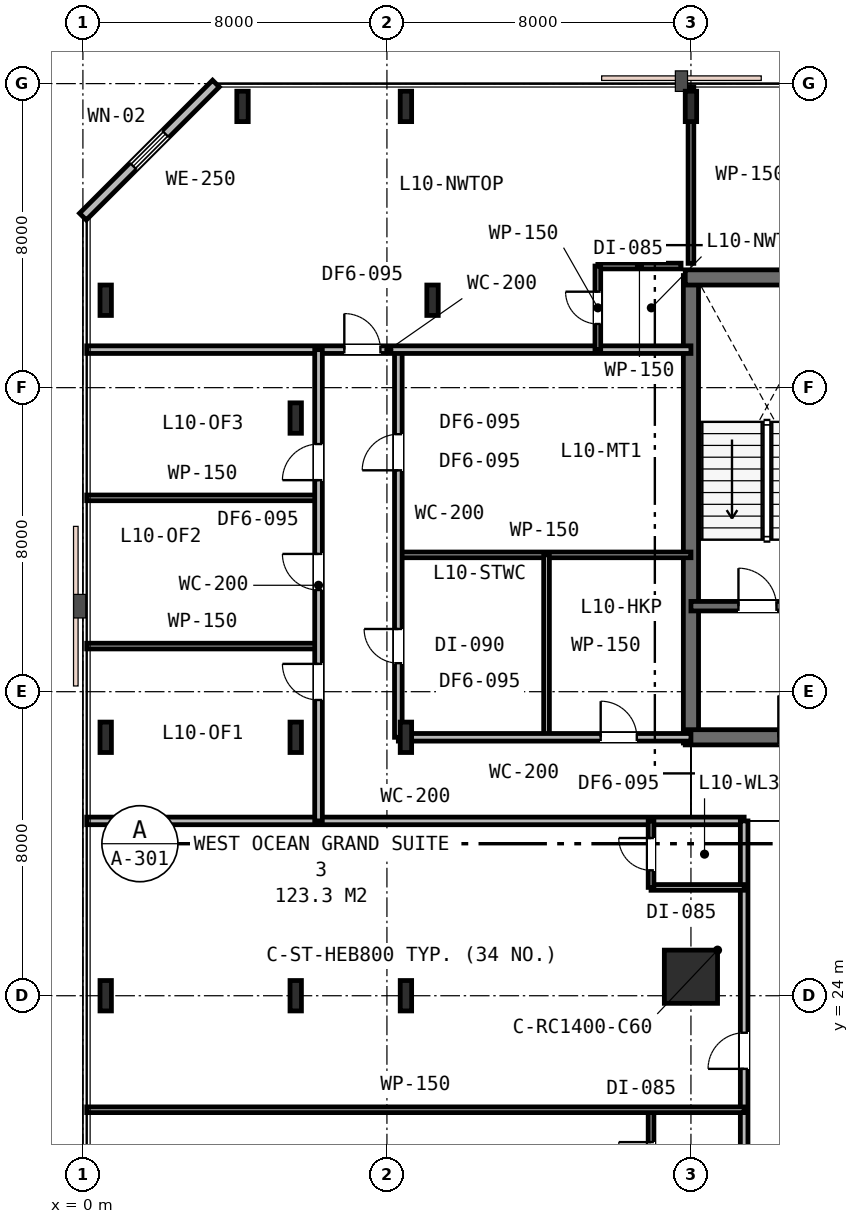
"""IFC4 building model, lengths in metres.
Left out: names, types, materials, properties, quantities, classifications, styles, units other than length and angle.
Written with IfcOpenShell. Run it as: python <this file> out.ifc"""

import sys

from ifc_helpers import new_model, si_unit, direction, frame, frame_2d, origin, origin_2d, place, context, subcontext, project, spatial, rectangle, i_section, extrude, element, fill, save


model = new_model("IFC4")
c1 = context("Model", 3, precision=1e-05, world=origin(), true_north=direction((0.0, 1.0)))
c2 = subcontext(c1, "Body", "Model", "MODEL_VIEW")
j1 = project(units=[si_unit("LENGTHUNIT", "METRE"), si_unit("PLANEANGLEUNIT", "RADIAN")], contexts=[c1])
p1 = place(None, origin())
s1 = spatial("IfcSite", under=j1, at=p1, CompositionType="ELEMENT")
p2 = place(p1, origin())
s2 = spatial("IfcBuilding", under=s1, at=p2, CompositionType="ELEMENT")
p3 = place(p2, frame((0.0, 0.0, 43.8)))
s3 = spatial("IfcBuildingStorey", under=s2, at=p3, CompositionType="ELEMENT", Elevation=43.8)
p4 = place(p3, frame((16.0, 30.65, 0.0), z_axis=(0.0, 0.0, 1.0), x_axis=(0.0, 1.0, 0.0)))
e1 = element("IfcWall", 1, at=p4, inside=s3, PredefinedType="SHEAR", context=c2, shape_type="SweptSolid", body=[
    extrude(rectangle(XDim=12.3, YDim=0.4, at=frame_2d((6.15, 0.0))), origin(), (0.0, 0.0, 1.0), 3.6),
])
p5 = place(p3, frame((15.85, 42.9, 0.0), z_axis=(0.0, 0.0, 1.0), x_axis=(1.0, 0.0, 0.0)))
e2 = element("IfcWall", 2, at=p5, inside=s3, PredefinedType="SHEAR", context=c2, shape_type="SweptSolid", body=[
    extrude(rectangle(XDim=24.3, YDim=0.4, at=frame_2d((12.15, 0.0))), origin(), (0.0, 0.0, 1.0), 3.6),
])
p6 = place(p3, frame((15.85, 30.8, 0.0), z_axis=(0.0, 0.0, 1.0), x_axis=(1.0, 0.0, 0.0)))
e3 = element("IfcWall", 3, at=p6, inside=s3, PredefinedType="SHEAR", context=c2, shape_type="SweptSolid", body=[
    extrude(rectangle(XDim=11.2, YDim=0.4, at=frame_2d((5.6, 0.0))), origin(), (0.0, 0.0, 1.0), 3.6),
])
p7 = place(p6, frame((2.45, 0.0, 0.0)))
e4 = element("IfcOpeningElement", 4, at=p7, cuts=e3, PredefinedType="OPENING", context=c2, shape_type="SweptSolid", body=[
    extrude(rectangle(XDim=1.1, YDim=2.15, at=frame_2d((0.55, 1.075))), frame((0.0, 0.21, 0.0), z_axis=(0.0, -1.0, 0.0), x_axis=(1.0, 0.0, 0.0)), (0.0, 0.0, 1.0), 0.42),
])
p8 = place(p3, frame((16.0, 34.25, 0.0), z_axis=(0.0, 0.0, 1.0), x_axis=(1.0, 0.0, 0.0)))
e5 = element("IfcWall", 5, at=p8, inside=s3, PredefinedType="SHEAR", context=c2, shape_type="SweptSolid", body=[
    extrude(rectangle(XDim=6.05, YDim=0.25, at=frame_2d((3.025, 0.0))), origin(), (0.0, 0.0, 1.0), 3.6),
])
p9 = place(p8, frame((1.25, 0.0, 0.0)))
e6 = element("IfcOpeningElement", 6, at=p9, cuts=e5, PredefinedType="OPENING", context=c2, shape_type="SweptSolid", body=[
    extrude(rectangle(XDim=1.0, YDim=2.15, at=frame_2d((0.5, 1.075))), frame((0.0, 0.135, 0.0), z_axis=(0.0, -1.0, 0.0), x_axis=(1.0, 0.0, 0.0)), (0.0, 0.0, 1.0), 0.27),
])
p10 = place(p8, frame((4.2, 0.0, 0.0)))
e7 = element("IfcOpeningElement", 7, at=p10, cuts=e5, PredefinedType="OPENING", context=c2, shape_type="SweptSolid", body=[
    extrude(rectangle(XDim=1.1, YDim=2.15, at=frame_2d((0.55, 1.075))), frame((0.0, 0.135, 0.0), z_axis=(0.0, -1.0, 0.0), x_axis=(1.0, 0.0, 0.0)), (0.0, 0.0, 1.0), 0.27),
])
p11 = place(p3, frame((8.5, 24.0, 0.0), z_axis=(0.0, 0.0, 1.0), x_axis=(1.0, 0.0, 0.0)))
e8 = element("IfcColumn", 8, at=p11, inside=s3, PredefinedType="COLUMN", context=c2, shape_type="SweptSolid", body=[
    extrude(i_section(OverallWidth=0.3, OverallDepth=0.8, WebThickness=0.018, FlangeThickness=0.033, FilletRadius=0.03, at=origin_2d()), origin(), (0.0, 0.0, 1.0), 3.6),
])
p12 = place(p3, frame((16.0, 24.5, 0.0), z_axis=(0.0, 0.0, 1.0), x_axis=(1.0, 0.0, 0.0)))
e9 = element("IfcColumn", 9, at=p12, inside=s3, PredefinedType="COLUMN", context=c2, shape_type="SweptSolid", body=[
    extrude(rectangle(XDim=1.4, YDim=1.4, at=origin_2d()), origin(), (0.0, 0.0, 1.0), 3.6),
])
for number, where, z_axis, x_axis in (
    (10, (5.6, 24.0, 0.0), (0.0, 0.0, 1.0), (1.0, 0.0, 0.0)),
    (11, (5.6, 30.8, 0.0), (0.0, 0.0, 1.0), (1.0, 0.0, 0.0)),
    (12, (5.6, 39.2, 0.0), (0.0, 0.0, 1.0), (1.0, 0.0, 0.0)),
    (13, (8.5, 30.8, 0.0), (0.0, 0.0, 1.0), (1.0, 0.0, 0.0)),
    (14, (9.2, 42.3, 0.0), (0.0, 0.0, 1.0), (1.0, 0.0, 0.0)),
    (15, (0.6, 24.0, 0.0), (0.0, 0.0, 1.0), (1.0, 0.0, 0.0)),
    (16, (0.6, 30.8, 0.0), (0.0, 0.0, 1.0), (1.0, 0.0, 0.0)),
    (17, (0.6, 42.3, 0.0), (0.0, 0.0, 1.0), (1.0, 0.0, 0.0)),
    (18, (4.2, 47.4, 0.0), (0.0, 0.0, 1.0), (1.0, 0.0, 0.0)),
    (19, (8.5, 47.4, 0.0), (0.0, 0.0, 1.0), (1.0, 0.0, 0.0)),
    (20, (16.0, 47.4, 0.0), (0.0, 0.0, 1.0), (1.0, 0.0, 0.0)),
):
    element("IfcColumn", number, at=place(p3, frame(where, z_axis=z_axis, x_axis=x_axis)), inside=s3, PredefinedType="COLUMN", context=c2, shape_type="SweptSolid", body=[
        extrude(i_section(OverallWidth=0.3, OverallDepth=0.8, WebThickness=0.018, FlangeThickness=0.033, FilletRadius=0.03, at=origin_2d()), origin(), (0.0, 0.0, 1.0), 3.6),
    ])
p13 = place(p3, frame((3.5, 48.0, 0.0), z_axis=(0.0, 0.0, 1.0), x_axis=(-0.707106781187, -0.707106781187, 0.0)))
e21 = element("IfcWall", 21, at=p13, inside=s3, PredefinedType="STANDARD", context=c2, shape_type="SweptSolid", body=[
    extrude(rectangle(XDim=4.95, YDim=0.25, at=frame_2d((2.475, 0.0))), origin(), (0.0, 0.0, 1.0), 3.33),
])
p14 = place(p13, frame((1.875, 0.0, 0.85)))
e22 = element("IfcOpeningElement", 22, at=p14, cuts=e21, PredefinedType="OPENING", context=c2, shape_type="SweptSolid", body=[
    extrude(rectangle(XDim=1.2, YDim=1.6, at=frame_2d((0.6, 0.8))), frame((0.0, 0.135, 0.0), z_axis=(0.0, -1.0, 0.0), x_axis=(1.0, 0.0, 0.0)), (0.0, 0.0, 1.0), 0.27),
])
p15 = place(p3, frame((0.1, 28.6, 0.0), z_axis=(0.0, 0.0, 1.0), x_axis=(1.0, 0.0, 0.0)))
e23 = element("IfcWall", 23, at=p15, inside=s3, PredefinedType="PARTITIONING", context=c2, shape_type="SweptSolid", body=[
    extrude(rectangle(XDim=17.3, YDim=0.2, at=frame_2d((8.65, 0.0))), origin(), (0.0, 0.0, 1.0), 2.82),
])
p16 = place(p3, frame((8.3, 35.6, 0.0), z_axis=(0.0, 0.0, 1.0), x_axis=(1.0, 0.0, 0.0)))
e24 = element("IfcWall", 24, at=p16, inside=s3, PredefinedType="PARTITIONING", context=c2, shape_type="SweptSolid", body=[
    extrude(rectangle(XDim=7.7, YDim=0.15, at=frame_2d((3.85, 0.0))), origin(), (0.0, 0.0, 1.0), 2.82),
])
p17 = place(p3, frame((12.2, 30.8, 0.0), z_axis=(0.0, 0.0, 1.0), x_axis=(0.0, 1.0, 0.0)))
e25 = element("IfcWall", 25, at=p17, inside=s3, PredefinedType="PARTITIONING", context=c2, shape_type="SweptSolid", body=[
    extrude(rectangle(XDim=4.8, YDim=0.15, at=frame_2d((2.4, 0.0))), origin(), (0.0, 0.0, 1.0), 2.82),
])
p18 = place(p3, frame((8.3, 30.8, 0.0), z_axis=(0.0, 0.0, 1.0), x_axis=(1.0, 0.0, 0.0)))
e26 = element("IfcWall", 26, at=p18, inside=s3, PredefinedType="PARTITIONING", context=c2, shape_type="SweptSolid", body=[
    extrude(rectangle(XDim=7.7, YDim=0.2, at=frame_2d((3.85, 0.0))), origin(), (0.0, 0.0, 1.0), 2.82),
])
p19 = place(p18, frame((5.325, 0.0, 0.0)))
e27 = element("IfcOpeningElement", 27, at=p19, cuts=e26, PredefinedType="OPENING", context=c2, shape_type="SweptSolid", body=[
    extrude(rectangle(XDim=0.95, YDim=2.15, at=frame_2d((0.475, 1.075))), frame((0.0, 0.11, 0.0), z_axis=(0.0, -1.0, 0.0), x_axis=(1.0, 0.0, 0.0)), (0.0, 0.0, 1.0), 0.22),
])
p20 = place(p3, frame((8.3, 30.8, 0.0), z_axis=(0.0, 0.0, 1.0), x_axis=(0.0, 1.0, 0.0)))
e28 = element("IfcWall", 28, at=p20, inside=s3, PredefinedType="PARTITIONING", context=c2, shape_type="SweptSolid", body=[
    extrude(rectangle(XDim=10.2, YDim=0.2, at=frame_2d((5.1, 0.0))), origin(), (0.0, 0.0, 1.0), 2.82),
])
p21 = place(p20, frame((1.95, 0.0, 0.0)))
e29 = element("IfcOpeningElement", 29, at=p21, cuts=e28, PredefinedType="OPENING", context=c2, shape_type="SweptSolid", body=[
    extrude(rectangle(XDim=0.9, YDim=2.15, at=frame_2d((0.45, 1.075))), frame((0.0, 0.11, 0.0), z_axis=(0.0, -1.0, 0.0), x_axis=(1.0, 0.0, 0.0)), (0.0, 0.0, 1.0), 0.22),
])
p22 = place(p20, frame((7.025, 0.0, 0.0)))
e30 = element("IfcOpeningElement", 30, at=p22, cuts=e28, PredefinedType="OPENING", context=c2, shape_type="SweptSolid", body=[
    extrude(rectangle(XDim=0.95, YDim=2.15, at=frame_2d((0.475, 1.075))), frame((0.0, 0.11, 0.0), z_axis=(0.0, -1.0, 0.0), x_axis=(1.0, 0.0, 0.0)), (0.0, 0.0, 1.0), 0.22),
])
p23 = place(p3, frame((0.1, 41.0, 0.0), z_axis=(0.0, 0.0, 1.0), x_axis=(1.0, 0.0, 0.0)))
e31 = element("IfcWall", 31, at=p23, inside=s3, PredefinedType="PARTITIONING", context=c2, shape_type="SweptSolid", body=[
    extrude(rectangle(XDim=15.9, YDim=0.2, at=frame_2d((7.95, 0.0))), origin(), (0.0, 0.0, 1.0), 2.82),
])
p24 = place(p23, frame((6.779, 0.0, 0.0)))
e32 = element("IfcOpeningElement", 32, at=p24, cuts=e31, PredefinedType="OPENING", context=c2, shape_type="SweptSolid", body=[
    extrude(rectangle(XDim=0.95, YDim=2.15, at=frame_2d((0.475, 1.075))), frame((0.0, 0.11, 0.0), z_axis=(0.0, -1.0, 0.0), x_axis=(1.0, 0.0, 0.0)), (0.0, 0.0, 1.0), 0.22),
])
p25 = place(p3, frame((13.55, 43.2, 0.0), z_axis=(0.0, 0.0, 1.0), x_axis=(1.0, 0.0, 0.0)))
e33 = element("IfcWall", 33, at=p25, inside=s3, PredefinedType="PARTITIONING", context=c2, shape_type="SweptSolid", body=[
    extrude(rectangle(XDim=2.19, YDim=0.15, at=frame_2d((1.095, 0.0))), origin(), (0.0, 0.0, 1.0), 3.33),
])
p26 = place(p3, frame((13.55, 41.0, 0.0), z_axis=(0.0, 0.0, 1.0), x_axis=(0.0, 1.0, 0.0)))
e34 = element("IfcWall", 34, at=p26, inside=s3, PredefinedType="PARTITIONING", context=c2, shape_type="SweptSolid", body=[
    extrude(rectangle(XDim=2.2, YDim=0.15, at=frame_2d((1.1, 0.0))), origin(), (0.0, 0.0, 1.0), 3.33),
])
p27 = place(p26, frame((0.675, 0.0, 0.0)))
e35 = element("IfcOpeningElement", 35, at=p27, cuts=e34, PredefinedType="OPENING", context=c2, shape_type="SweptSolid", body=[
    extrude(rectangle(XDim=0.85, YDim=2.15, at=frame_2d((0.425, 1.075))), frame((0.0, 0.085, 0.0), z_axis=(0.0, -1.0, 0.0), x_axis=(1.0, 0.0, 0.0)), (0.0, 0.0, 1.0), 0.17),
])
for number, where, z_axis, x_axis in (
    (36, (0.1, 33.2, 0.0), (0.0, 0.0, 1.0), (1.0, 0.0, 0.0)),
    (37, (0.1, 37.1, 0.0), (0.0, 0.0, 1.0), (1.0, 0.0, 0.0)),
):
    element("IfcWall", number, at=place(p3, frame(where, z_axis=z_axis, x_axis=x_axis)), inside=s3, PredefinedType="PARTITIONING", context=c2, shape_type="SweptSolid", body=[
        extrude(rectangle(XDim=6.1, YDim=0.15, at=frame_2d((3.05, 0.0))), origin(), (0.0, 0.0, 1.0), 2.82),
    ])
p28 = place(p3, frame((6.2, 28.6, 0.0), z_axis=(0.0, 0.0, 1.0), x_axis=(0.0, 1.0, 0.0)))
e38 = element("IfcWall", 38, at=p28, inside=s3, PredefinedType="PARTITIONING", context=c2, shape_type="SweptSolid", body=[
    extrude(rectangle(XDim=12.4, YDim=0.2, at=frame_2d((6.2, 0.0))), origin(), (0.0, 0.0, 1.0), 2.82),
])
p29 = place(p28, frame((3.182, 0.0, 0.0)))
e39 = element("IfcOpeningElement", 39, at=p29, cuts=e38, PredefinedType="OPENING", context=c2, shape_type="SweptSolid", body=[
    extrude(rectangle(XDim=0.95, YDim=2.15, at=frame_2d((0.475, 1.075))), frame((0.0, 0.11, 0.0), z_axis=(0.0, -1.0, 0.0), x_axis=(1.0, 0.0, 0.0)), (0.0, 0.0, 1.0), 0.22),
])
p30 = place(p28, frame((6.075, 0.0, 0.0)))
e40 = element("IfcOpeningElement", 40, at=p30, cuts=e38, PredefinedType="OPENING", context=c2, shape_type="SweptSolid", body=[
    extrude(rectangle(XDim=0.95, YDim=2.15, at=frame_2d((0.475, 1.075))), frame((0.0, 0.11, 0.0), z_axis=(0.0, -1.0, 0.0), x_axis=(1.0, 0.0, 0.0)), (0.0, 0.0, 1.0), 0.22),
])
p31 = place(p28, frame((8.966, 0.0, 0.0)))
e41 = element("IfcOpeningElement", 41, at=p31, cuts=e38, PredefinedType="OPENING", context=c2, shape_type="SweptSolid", body=[
    extrude(rectangle(XDim=0.95, YDim=2.15, at=frame_2d((0.475, 1.075))), frame((0.0, 0.11, 0.0), z_axis=(0.0, -1.0, 0.0), x_axis=(1.0, 0.0, 0.0)), (0.0, 0.0, 1.0), 0.22),
])
p32 = place(p3, frame((16.0, 43.27, 0.0), z_axis=(0.0, 0.0, 1.0), x_axis=(0.0, 1.0, 0.0)))
e42 = element("IfcWall", 42, at=p32, inside=s3, PredefinedType="PARTITIONING", context=c2, shape_type="SweptSolid", body=[
    extrude(rectangle(XDim=4.63, YDim=0.15, at=frame_2d((2.315, 0.0))), origin(), (0.0, 0.0, 1.0), 2.93),
])
p33 = place(p3, frame((17.4, 5.6, 0.0), z_axis=(0.0, 0.0, 1.0), x_axis=(0.0, 1.0, 0.0)))
e43 = element("IfcWall", 43, at=p33, inside=s3, PredefinedType="PARTITIONING", context=c2, shape_type="SweptSolid", body=[
    extrude(rectangle(XDim=23.0, YDim=0.2, at=frame_2d((11.5, 0.0))), origin(), (0.0, 0.0, 1.0), 2.82),
])
p34 = place(p33, frame((0.84, 0.0, 0.0)))
e44 = element("IfcOpeningElement", 44, at=p34, cuts=e43, PredefinedType="OPENING", context=c2, shape_type="SweptSolid", body=[
    extrude(rectangle(XDim=0.95, YDim=2.15, at=frame_2d((0.475, 1.075))), frame((0.0, 0.11, 0.0), z_axis=(0.0, -1.0, 0.0), x_axis=(1.0, 0.0, 0.0)), (0.0, 0.0, 1.0), 0.22),
])
p35 = place(p33, frame((8.983, 0.0, 0.0)))
e45 = element("IfcOpeningElement", 45, at=p35, cuts=e43, PredefinedType="OPENING", context=c2, shape_type="SweptSolid", body=[
    extrude(rectangle(XDim=0.95, YDim=2.15, at=frame_2d((0.475, 1.075))), frame((0.0, 0.11, 0.0), z_axis=(0.0, -1.0, 0.0), x_axis=(1.0, 0.0, 0.0)), (0.0, 0.0, 1.0), 0.22),
])
p36 = place(p33, frame((16.476, 0.0, 0.0)))
e46 = element("IfcOpeningElement", 46, at=p36, cuts=e43, PredefinedType="OPENING", context=c2, shape_type="SweptSolid", body=[
    extrude(rectangle(XDim=0.95, YDim=2.15, at=frame_2d((0.475, 1.075))), frame((0.0, 0.11, 0.0), z_axis=(0.0, -1.0, 0.0), x_axis=(1.0, 0.0, 0.0)), (0.0, 0.0, 1.0), 0.22),
])
p37 = place(p3, frame((14.95, 16.0, 0.0), z_axis=(0.0, 0.0, 1.0), x_axis=(0.0, 1.0, 0.0)))
e47 = element("IfcWall", 47, at=p37, inside=s3, PredefinedType="PARTITIONING", context=c2, shape_type="SweptSolid", body=[
    extrude(rectangle(XDim=5.0, YDim=0.15, at=frame_2d((2.5, 0.0))), origin(), (0.0, 0.0, 1.0), 2.82),
])
p38 = place(p37, frame((3.298, 0.0, 0.0)))
e48 = element("IfcOpeningElement", 48, at=p38, cuts=e47, PredefinedType="OPENING", context=c2, shape_type="SweptSolid", body=[
    extrude(rectangle(XDim=0.85, YDim=2.15, at=frame_2d((0.425, 1.075))), frame((0.0, 0.085, 0.0), z_axis=(0.0, -1.0, 0.0), x_axis=(1.0, 0.0, 0.0)), (0.0, 0.0, 1.0), 0.17),
])
p39 = place(p3, frame((0.1, 21.0, 0.0), z_axis=(0.0, 0.0, 1.0), x_axis=(1.0, 0.0, 0.0)))
e49 = element("IfcWall", 49, at=p39, inside=s3, PredefinedType="PARTITIONING", context=c2, shape_type="SweptSolid", body=[
    extrude(rectangle(XDim=17.3, YDim=0.15, at=frame_2d((8.65, 0.0))), origin(), (0.0, 0.0, 1.0), 2.82),
])
p40 = place(p3, frame((14.95, 26.85, 0.0), z_axis=(0.0, 0.0, 1.0), x_axis=(1.0, 0.0, 0.0)))
e50 = element("IfcWall", 50, at=p40, inside=s3, PredefinedType="PARTITIONING", context=c2, shape_type="SweptSolid", body=[
    extrude(rectangle(XDim=2.45, YDim=0.15, at=frame_2d((1.225, 0.0))), origin(), (0.0, 0.0, 1.0), 2.82),
])
p41 = place(p3, frame((14.95, 26.85, 0.0), z_axis=(0.0, 0.0, 1.0), x_axis=(0.0, 1.0, 0.0)))
e51 = element("IfcWall", 51, at=p41, inside=s3, PredefinedType="PARTITIONING", context=c2, shape_type="SweptSolid", body=[
    extrude(rectangle(XDim=1.75, YDim=0.15, at=frame_2d((0.875, 0.0))), origin(), (0.0, 0.0, 1.0), 3.33),
])
p42 = place(p41, frame((0.45, 0.0, 0.0)))
e52 = element("IfcOpeningElement", 52, at=p42, cuts=e51, PredefinedType="OPENING", context=c2, shape_type="SweptSolid", body=[
    extrude(rectangle(XDim=0.85, YDim=2.15, at=frame_2d((0.425, 1.075))), frame((0.0, 0.085, 0.0), z_axis=(0.0, -1.0, 0.0), x_axis=(1.0, 0.0, 0.0)), (0.0, 0.0, 1.0), 0.17),
])
p43 = place(p14, origin())
e53 = element("IfcWindow", 53, at=p43, inside=s3, PartitioningType="SINGLE_PANEL", PredefinedType="WINDOW", context=c2, shape_type="SweptSolid", body=[
    extrude(rectangle(XDim=1.2, YDim=1.6, at=frame_2d((0.6, 0.8))), frame((0.0, 0.03, 0.0), z_axis=(0.0, -1.0, 0.0), x_axis=(1.0, 0.0, 0.0)), (0.0, 0.0, 1.0), 0.06),
])
fill(e22, e53)
p44 = place(p9, origin())
e54 = element("IfcDoor", 54, at=p44, inside=s3, OperationType="SINGLE_SWING_LEFT", PredefinedType="DOOR", context=c2, shape_type="SweptSolid", body=[
    extrude(rectangle(XDim=1.0, YDim=2.15, at=frame_2d((0.5, 1.075))), frame((0.0, 0.025, 0.0), z_axis=(0.0, -1.0, 0.0), x_axis=(1.0, 0.0, 0.0)), (0.0, 0.0, 1.0), 0.05),
])
fill(e6, e54)
p45 = place(p7, origin())
e55 = element("IfcDoor", 55, at=p45, inside=s3, OperationType="SINGLE_SWING_LEFT", PredefinedType="DOOR", context=c2, shape_type="SweptSolid", body=[
    extrude(rectangle(XDim=1.1, YDim=2.15, at=frame_2d((0.55, 1.075))), frame((0.0, 0.025, 0.0), z_axis=(0.0, -1.0, 0.0), x_axis=(1.0, 0.0, 0.0)), (0.0, 0.0, 1.0), 0.05),
])
fill(e4, e55)
p46 = place(p19, origin())
e56 = element("IfcDoor", 56, at=p46, inside=s3, OperationType="SINGLE_SWING_LEFT", PredefinedType="DOOR", context=c2, shape_type="SweptSolid", body=[
    extrude(rectangle(XDim=0.95, YDim=2.15, at=frame_2d((0.475, 1.075))), frame((0.0, 0.025, 0.0), z_axis=(0.0, -1.0, 0.0), x_axis=(1.0, 0.0, 0.0)), (0.0, 0.0, 1.0), 0.05),
])
fill(e27, e56)
p47 = place(p21, origin())
e57 = element("IfcDoor", 57, at=p47, inside=s3, OperationType="SINGLE_SWING_RIGHT", PredefinedType="DOOR", context=c2, shape_type="SweptSolid", body=[
    extrude(rectangle(XDim=0.9, YDim=2.15, at=frame_2d((0.45, 1.075))), frame((0.0, 0.025, 0.0), z_axis=(0.0, -1.0, 0.0), x_axis=(1.0, 0.0, 0.0)), (0.0, 0.0, 1.0), 0.05),
])
fill(e29, e57)
p48 = place(p24, origin())
e58 = element("IfcDoor", 58, at=p48, inside=s3, OperationType="SINGLE_SWING_LEFT", PredefinedType="DOOR", context=c2, shape_type="SweptSolid", body=[
    extrude(rectangle(XDim=0.95, YDim=2.15, at=frame_2d((0.475, 1.075))), frame((0.0, 0.025, 0.0), z_axis=(0.0, -1.0, 0.0), x_axis=(1.0, 0.0, 0.0)), (0.0, 0.0, 1.0), 0.05),
])
fill(e32, e58)
p49 = place(p27, origin())
e59 = element("IfcDoor", 59, at=p49, inside=s3, OperationType="SINGLE_SWING_RIGHT", PredefinedType="DOOR", context=c2, shape_type="SweptSolid", body=[
    extrude(rectangle(XDim=0.85, YDim=2.15, at=frame_2d((0.425, 1.075))), frame((0.0, 0.025, 0.0), z_axis=(0.0, -1.0, 0.0), x_axis=(1.0, 0.0, 0.0)), (0.0, 0.0, 1.0), 0.05),
])
fill(e35, e59)
p50 = place(p29, origin())
e60 = element("IfcDoor", 60, at=p50, inside=s3, OperationType="SINGLE_SWING_RIGHT", PredefinedType="DOOR", context=c2, shape_type="SweptSolid", body=[
    extrude(rectangle(XDim=0.95, YDim=2.15, at=frame_2d((0.475, 1.075))), frame((0.0, 0.025, 0.0), z_axis=(0.0, -1.0, 0.0), x_axis=(1.0, 0.0, 0.0)), (0.0, 0.0, 1.0), 0.05),
])
fill(e39, e60)
p51 = place(p30, origin())
e61 = element("IfcDoor", 61, at=p51, inside=s3, OperationType="SINGLE_SWING_RIGHT", PredefinedType="DOOR", context=c2, shape_type="SweptSolid", body=[
    extrude(rectangle(XDim=0.95, YDim=2.15, at=frame_2d((0.475, 1.075))), frame((0.0, 0.025, 0.0), z_axis=(0.0, -1.0, 0.0), x_axis=(1.0, 0.0, 0.0)), (0.0, 0.0, 1.0), 0.05),
])
fill(e40, e61)
p52 = place(p31, origin())
e62 = element("IfcDoor", 62, at=p52, inside=s3, OperationType="SINGLE_SWING_LEFT", PredefinedType="DOOR", context=c2, shape_type="SweptSolid", body=[
    extrude(rectangle(XDim=0.95, YDim=2.15, at=frame_2d((0.475, 1.075))), frame((0.0, 0.025, 0.0), z_axis=(0.0, -1.0, 0.0), x_axis=(1.0, 0.0, 0.0)), (0.0, 0.0, 1.0), 0.05),
])
fill(e41, e62)
p53 = place(p22, origin())
e63 = element("IfcDoor", 63, at=p53, inside=s3, OperationType="SINGLE_SWING_LEFT", PredefinedType="DOOR", context=c2, shape_type="SweptSolid", body=[
    extrude(rectangle(XDim=0.95, YDim=2.15, at=frame_2d((0.475, 1.075))), frame((0.0, 0.025, 0.0), z_axis=(0.0, -1.0, 0.0), x_axis=(1.0, 0.0, 0.0)), (0.0, 0.0, 1.0), 0.05),
])
fill(e30, e63)
p54 = place(p38, origin())
e64 = element("IfcDoor", 64, at=p54, inside=s3, OperationType="SINGLE_SWING_RIGHT", PredefinedType="DOOR", context=c2, shape_type="SweptSolid", body=[
    extrude(rectangle(XDim=0.85, YDim=2.15, at=frame_2d((0.425, 1.075))), frame((0.0, 0.025, 0.0), z_axis=(0.0, -1.0, 0.0), x_axis=(1.0, 0.0, 0.0)), (0.0, 0.0, 1.0), 0.05),
])
fill(e48, e64)
p55 = place(p36, origin())
e65 = element("IfcDoor", 65, at=p55, inside=s3, OperationType="SINGLE_SWING_LEFT", PredefinedType="DOOR", context=c2, shape_type="SweptSolid", body=[
    extrude(rectangle(XDim=0.95, YDim=2.15, at=frame_2d((0.475, 1.075))), frame((0.0, 0.025, 0.0), z_axis=(0.0, -1.0, 0.0), x_axis=(1.0, 0.0, 0.0)), (0.0, 0.0, 1.0), 0.05),
])
fill(e46, e65)
p56 = place(p42, origin())
e66 = element("IfcDoor", 66, at=p56, inside=s3, OperationType="SINGLE_SWING_RIGHT", PredefinedType="DOOR", context=c2, shape_type="SweptSolid", body=[
    extrude(rectangle(XDim=0.85, YDim=2.15, at=frame_2d((0.425, 1.075))), frame((0.0, 0.025, 0.0), z_axis=(0.0, -1.0, 0.0), x_axis=(1.0, 0.0, 0.0)), (0.0, 0.0, 1.0), 0.05),
])
fill(e52, e66)
save(model, sys.argv[1])
